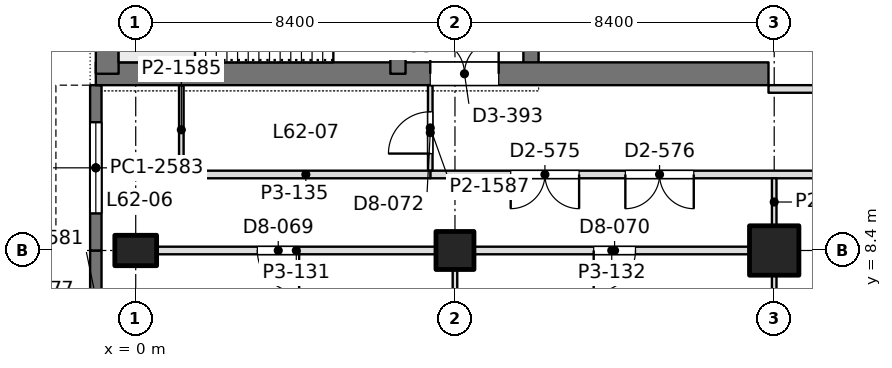
"""IFC4 building model, lengths in metres.
Left out: names, types, materials, properties, quantities, classifications, styles, units other than length and angle.
Written with IfcOpenShell. Run it as: python <this file> out.ifc"""

import sys

from ifc_helpers import new_model, si_unit, direction, frame, frame_2d, origin, origin_2d, place, context, subcontext, project, spatial, rectangle, extrude, element, fill, save


model = new_model("IFC4")
c1 = context("Model", 3, precision=1e-05, world=origin(), true_north=direction((0.0, 1.0)))
c2 = subcontext(c1, "Body", "Model", "MODEL_VIEW")
j1 = project(units=[si_unit("LENGTHUNIT", "METRE"), si_unit("PLANEANGLEUNIT", "RADIAN")], contexts=[c1])
p1 = place(None, origin())
s1 = spatial("IfcSite", under=j1, at=p1, CompositionType="ELEMENT")
p2 = place(p1, origin())
s2 = spatial("IfcBuilding", under=s1, at=p2, CompositionType="ELEMENT")
p3 = place(p2, frame((0.0, 0.0, 272.7)))
s3 = spatial("IfcBuildingStorey", under=s2, at=p3, CompositionType="ELEMENT", Elevation=272.7)
p4 = place(p3, frame((0.0, 8.4, 0.0), z_axis=(0.0, 0.0, 1.0), x_axis=(0.0, 1.0, 0.0)))
e1 = element("IfcColumn", 1, at=p4, inside=s3, PredefinedType="COLUMN", context=c2, shape_type="SweptSolid", body=[
    extrude(rectangle(XDim=0.8, YDim=1.1, at=origin_2d()), origin(), (0.0, 0.0, 1.0), 4.5),
])
p5 = place(p3, frame((8.4, 8.4, 0.0), z_axis=(0.0, 0.0, 1.0), x_axis=(1.0, 0.0, 0.0)))
e2 = element("IfcColumn", 2, at=p5, inside=s3, PredefinedType="COLUMN", context=c2, shape_type="SweptSolid", body=[
    extrude(rectangle(XDim=1.0, YDim=1.0, at=origin_2d()), origin(), (0.0, 0.0, 1.0), 4.5),
])
p6 = place(p3, frame((16.8, 8.4, 0.0), z_axis=(0.0, 0.0, 1.0), x_axis=(1.0, 0.0, 0.0)))
e3 = element("IfcColumn", 3, at=p6, inside=s3, PredefinedType="COLUMN", context=c2, shape_type="SweptSolid", body=[
    extrude(rectangle(XDim=1.3, YDim=1.3, at=origin_2d()), origin(), (0.0, 0.0, 1.0), 4.5),
])
p7 = place(p3, frame((-1.05, 13.05, 0.0), z_axis=(0.0, 0.0, 1.0), x_axis=(1.0, 0.0, 0.0)))
e4 = element("IfcWall", 4, at=p7, inside=s3, PredefinedType="SHEAR", context=c2, shape_type="SweptSolid", body=[
    extrude(rectangle(XDim=17.7, YDim=0.6, at=frame_2d((8.85, 0.0))), origin(), (0.0, 0.0, 1.0), 4.5),
])
p8 = place(p7, frame((8.8, 0.0, 0.0)))
e5 = element("IfcOpeningElement", 5, at=p8, cuts=e4, PredefinedType="OPENING", context=c2, shape_type="SweptSolid", body=[
    extrude(rectangle(XDim=1.8, YDim=2.4, at=frame_2d((0.9, 1.2))), frame((0.0, 0.31, 0.0), z_axis=(0.0, -1.0, 0.0), x_axis=(1.0, 0.0, 0.0)), (0.0, 0.0, 1.0), 0.62),
])
p9 = place(p3, frame((-0.75, 13.05, 0.0), z_axis=(0.0, 0.0, 1.0), x_axis=(0.0, 1.0, 0.0)))
e6 = element("IfcWall", 6, at=p9, inside=s3, PredefinedType="SHEAR", context=c2, shape_type="SweptSolid", body=[
    extrude(rectangle(XDim=24.3, YDim=0.6, at=frame_2d((12.15, 0.0))), origin(), (0.0, 0.0, 1.0), 4.5),
])
p10 = place(p3, frame((6.9, 13.05, 0.0), z_axis=(0.0, 0.0, 1.0), x_axis=(0.0, 1.0, 0.0)))
e7 = element("IfcWall", 7, at=p10, inside=s3, PredefinedType="SHEAR", context=c2, shape_type="SweptSolid", body=[
    extrude(rectangle(XDim=24.3, YDim=0.4, at=frame_2d((12.15, 0.0))), origin(), (0.0, 0.0, 1.0), 4.5),
])
p11 = place(p10, frame((1.3, 0.0, 0.0)))
e8 = element("IfcOpeningElement", 8, at=p11, cuts=e7, PredefinedType="OPENING", context=c2, shape_type="SweptSolid", body=[
    extrude(rectangle(XDim=1.0, YDim=2.2, at=frame_2d((0.5, 1.1))), frame((0.0, 0.21, 0.0), z_axis=(0.0, -1.0, 0.0), x_axis=(1.0, 0.0, 0.0)), (0.0, 0.0, 1.0), 0.42),
])
p12 = place(p10, frame((22.0, 0.0, 0.0)))
e9 = element("IfcOpeningElement", 9, at=p12, cuts=e7, PredefinedType="OPENING", context=c2, shape_type="SweptSolid", body=[
    extrude(rectangle(XDim=1.0, YDim=2.2, at=frame_2d((0.5, 1.1))), frame((0.0, 0.21, 0.0), z_axis=(0.0, -1.0, 0.0), x_axis=(1.0, 0.0, 0.0)), (0.0, 0.0, 1.0), 0.42),
])
p13 = place(p10, frame((5.55, 0.0, 0.0)))
e10 = element("IfcOpeningElement", 10, at=p13, cuts=e7, PredefinedType="OPENING", context=c2, shape_type="SweptSolid", body=[
    extrude(rectangle(XDim=1.0, YDim=2.2, at=frame_2d((0.5, 1.1))), frame((0.0, 0.21, 0.0), z_axis=(0.0, -1.0, 0.0), x_axis=(1.0, 0.0, 0.0)), (0.0, 0.0, 1.0), 0.42),
])
p14 = place(p10, frame((9.55, 0.0, 0.0)))
e11 = element("IfcOpeningElement", 11, at=p14, cuts=e7, PredefinedType="OPENING", context=c2, shape_type="SweptSolid", body=[
    extrude(rectangle(XDim=1.0, YDim=2.2, at=frame_2d((0.5, 1.1))), frame((0.0, 0.21, 0.0), z_axis=(0.0, -1.0, 0.0), x_axis=(1.0, 0.0, 0.0)), (0.0, 0.0, 1.0), 0.42),
])
p15 = place(p10, frame((12.8, 0.0, 0.0)))
e12 = element("IfcOpeningElement", 12, at=p15, cuts=e7, PredefinedType="OPENING", context=c2, shape_type="SweptSolid", body=[
    extrude(rectangle(XDim=1.1, YDim=2.2, at=frame_2d((0.55, 1.1))), frame((0.0, 0.21, 0.0), z_axis=(0.0, -1.0, 0.0), x_axis=(1.0, 0.0, 0.0)), (0.0, 0.0, 1.0), 0.42),
])
p16 = place(p10, frame((15.538, 0.0, 0.0)))
e13 = element("IfcOpeningElement", 13, at=p16, cuts=e7, PredefinedType="OPENING", context=c2, shape_type="SweptSolid", body=[
    extrude(rectangle(XDim=1.1, YDim=2.2, at=frame_2d((0.55, 1.1))), frame((0.0, 0.21, 0.0), z_axis=(0.0, -1.0, 0.0), x_axis=(1.0, 0.0, 0.0)), (0.0, 0.0, 1.0), 0.42),
])
p17 = place(p10, frame((18.262, 0.0, 0.0)))
e14 = element("IfcOpeningElement", 14, at=p17, cuts=e7, PredefinedType="OPENING", context=c2, shape_type="SweptSolid", body=[
    extrude(rectangle(XDim=1.1, YDim=2.2, at=frame_2d((0.55, 1.1))), frame((0.0, 0.21, 0.0), z_axis=(0.0, -1.0, 0.0), x_axis=(1.0, 0.0, 0.0)), (0.0, 0.0, 1.0), 0.42),
])
p18 = place(p3, frame((10.4, 13.05, 0.0), z_axis=(0.0, 0.0, 1.0), x_axis=(0.0, 1.0, 0.0)))
e15 = element("IfcWall", 15, at=p18, inside=s3, PredefinedType="SHEAR", context=c2, shape_type="SweptSolid", body=[
    extrude(rectangle(XDim=24.3, YDim=0.4, at=frame_2d((12.15, 0.0))), origin(), (0.0, 0.0, 1.0), 4.5),
])
p19 = place(p18, frame((15.75, 0.0, 0.0)))
e16 = element("IfcOpeningElement", 16, at=p19, cuts=e15, PredefinedType="OPENING", context=c2, shape_type="SweptSolid", body=[
    extrude(rectangle(XDim=1.1, YDim=2.2, at=frame_2d((0.55, 1.1))), frame((0.0, 0.21, 0.0), z_axis=(0.0, -1.0, 0.0), x_axis=(1.0, 0.0, 0.0)), (0.0, 0.0, 1.0), 0.42),
])
p20 = place(p18, frame((18.6, 0.0, 0.0)))
e17 = element("IfcOpeningElement", 17, at=p20, cuts=e15, PredefinedType="OPENING", context=c2, shape_type="SweptSolid", body=[
    extrude(rectangle(XDim=1.1, YDim=2.2, at=frame_2d((0.55, 1.1))), frame((0.0, 0.21, 0.0), z_axis=(0.0, -1.0, 0.0), x_axis=(1.0, 0.0, 0.0)), (0.0, 0.0, 1.0), 0.42),
])
p21 = place(p18, frame((21.45, 0.0, 0.0)))
e18 = element("IfcOpeningElement", 18, at=p21, cuts=e15, PredefinedType="OPENING", context=c2, shape_type="SweptSolid", body=[
    extrude(rectangle(XDim=1.1, YDim=2.2, at=frame_2d((0.55, 1.1))), frame((0.0, 0.21, 0.0), z_axis=(0.0, -1.0, 0.0), x_axis=(1.0, 0.0, 0.0)), (0.0, 0.0, 1.0), 0.42),
])
p22 = place(p18, frame((8.65, 0.0, 0.0)))
e19 = element("IfcOpeningElement", 19, at=p22, cuts=e15, PredefinedType="OPENING", context=c2, shape_type="SweptSolid", body=[
    extrude(rectangle(XDim=1.8, YDim=2.4, at=frame_2d((0.9, 1.2))), frame((0.0, 0.21, 0.0), z_axis=(0.0, -1.0, 0.0), x_axis=(1.0, 0.0, 0.0)), (0.0, 0.0, 1.0), 0.42),
])
p23 = place(p3, frame((-1.05, 5.915, 0.0), z_axis=(0.0, 0.0, 1.0), x_axis=(0.0, 1.0, 0.0)))
e20 = element("IfcWall", 20, at=p23, inside=s3, PredefinedType="SOLIDWALL", context=c2, shape_type="SweptSolid", body=[
    extrude(rectangle(XDim=2.485, YDim=0.3, at=frame_2d((1.243, 0.0))), origin(), (0.0, 0.0, 1.0), 4.35),
])
p24 = place(p3, frame((-1.05, 8.4, 0.0), z_axis=(0.0, 0.0, 1.0), x_axis=(0.0, 1.0, 0.0)))
e21 = element("IfcWall", 21, at=p24, inside=s3, PredefinedType="SOLIDWALL", context=c2, shape_type="SweptSolid", body=[
    extrude(rectangle(XDim=4.35, YDim=0.3, at=frame_2d((2.175, 0.0))), origin(), (0.0, 0.0, 1.0), 4.35),
])
p25 = place(p24, frame((0.975, 0.0, 0.9)))
e22 = element("IfcOpeningElement", 22, at=p25, cuts=e21, PredefinedType="OPENING", context=c2, shape_type="SweptSolid", body=[
    extrude(rectangle(XDim=2.4, YDim=1.9, at=frame_2d((1.2, 0.95))), frame((0.0, 0.16, 0.0), z_axis=(0.0, -1.0, 0.0), x_axis=(1.0, 0.0, 0.0)), (0.0, 0.0, 1.0), 0.32),
])
p26 = place(p3, frame((0.549, 8.4, 0.0), z_axis=(0.0, 0.0, 1.0), x_axis=(1.0, 0.0, 0.0)))
e23 = element("IfcWall", 23, at=p26, inside=s3, PredefinedType="PARTITIONING", context=c2, shape_type="SweptSolid", body=[
    extrude(rectangle(XDim=7.352, YDim=0.2, at=frame_2d((3.676, 0.0))), origin(), (0.0, 0.0, 1.0), 3.8),
])
p27 = place(p26, frame((2.651, 0.0, 0.0)))
e24 = element("IfcOpeningElement", 24, at=p27, cuts=e23, PredefinedType="OPENING", context=c2, shape_type="SweptSolid", body=[
    extrude(rectangle(XDim=1.1, YDim=2.4, at=frame_2d((0.55, 1.2))), frame((0.0, 0.11, 0.0), z_axis=(0.0, -1.0, 0.0), x_axis=(1.0, 0.0, 0.0)), (0.0, 0.0, 1.0), 0.22),
])
p28 = place(p3, frame((8.899, 8.4, 0.0), z_axis=(0.0, 0.0, 1.0), x_axis=(1.0, 0.0, 0.0)))
e25 = element("IfcWall", 25, at=p28, inside=s3, PredefinedType="PARTITIONING", context=c2, shape_type="SweptSolid", body=[
    extrude(rectangle(XDim=7.252, YDim=0.2, at=frame_2d((3.626, 0.0))), origin(), (0.0, 0.0, 1.0), 3.8),
])
p29 = place(p28, frame((3.151, 0.0, 0.0)))
e26 = element("IfcOpeningElement", 26, at=p29, cuts=e25, PredefinedType="OPENING", context=c2, shape_type="SweptSolid", body=[
    extrude(rectangle(XDim=1.1, YDim=2.4, at=frame_2d((0.55, 1.2))), frame((0.0, 0.11, 0.0), z_axis=(0.0, -1.0, 0.0), x_axis=(1.0, 0.0, 0.0)), (0.0, 0.0, 1.0), 0.22),
])
p30 = place(p3, frame((8.4, 6.149, 0.0), z_axis=(0.0, 0.0, 1.0), x_axis=(0.0, 1.0, 0.0)))
e27 = element("IfcWall", 27, at=p30, inside=s3, PredefinedType="PARTITIONING", context=c2, shape_type="SweptSolid", body=[
    extrude(rectangle(XDim=1.752, YDim=0.12, at=frame_2d((0.876, 0.0))), origin(), (0.0, 0.0, 1.0), 3.99),
])
p31 = place(p3, frame((16.8, 6.149, 0.0), z_axis=(0.0, 0.0, 1.0), x_axis=(0.0, 1.0, 0.0)))
e28 = element("IfcWall", 28, at=p31, inside=s3, PredefinedType="PARTITIONING", context=c2, shape_type="SweptSolid", body=[
    extrude(rectangle(XDim=1.602, YDim=0.12, at=frame_2d((0.801, 0.0))), origin(), (0.0, 0.0, 1.0), 3.99),
])
p32 = place(p3, frame((16.8, 9.049, 0.0), z_axis=(0.0, 0.0, 1.0), x_axis=(0.0, 1.0, 0.0)))
e29 = element("IfcWall", 29, at=p32, inside=s3, PredefinedType="PARTITIONING", context=c2, shape_type="SweptSolid", body=[
    extrude(rectangle(XDim=1.253, YDim=0.12, at=frame_2d((0.626, 0.0))), origin(), (0.0, 0.0, 1.0), 3.99),
])
p33 = place(p3, frame((7.748, 10.4, 0.0), z_axis=(0.0, 0.0, 1.0), x_axis=(1.0, 0.0, 0.0)))
e30 = element("IfcWall", 30, at=p33, inside=s3, PredefinedType="PARTITIONING", context=c2, shape_type="SweptSolid", body=[
    extrude(rectangle(XDim=41.452, YDim=0.2, at=frame_2d((20.726, 0.0))), origin(), (0.0, 0.0, 1.0), 3.8),
])
p34 = place(p33, frame((2.119, 0.0, 0.0)))
e31 = element("IfcOpeningElement", 31, at=p34, cuts=e30, PredefinedType="OPENING", context=c2, shape_type="SweptSolid", body=[
    extrude(rectangle(XDim=1.8, YDim=2.2, at=frame_2d((0.9, 1.1))), frame((0.0, 0.11, 0.0), z_axis=(0.0, -1.0, 0.0), x_axis=(1.0, 0.0, 0.0)), (0.0, 0.0, 1.0), 0.22),
])
p35 = place(p33, frame((5.135, 0.0, 0.0)))
e32 = element("IfcOpeningElement", 32, at=p35, cuts=e30, PredefinedType="OPENING", context=c2, shape_type="SweptSolid", body=[
    extrude(rectangle(XDim=1.8, YDim=2.2, at=frame_2d((0.9, 1.1))), frame((0.0, 0.11, 0.0), z_axis=(0.0, -1.0, 0.0), x_axis=(1.0, 0.0, 0.0)), (0.0, 0.0, 1.0), 0.22),
])
p36 = place(p33, frame((18.952, 0.0, 0.0)))
e33 = element("IfcOpeningElement", 33, at=p36, cuts=e30, PredefinedType="OPENING", context=c2, shape_type="SweptSolid", body=[
    extrude(rectangle(XDim=1.8, YDim=2.2, at=frame_2d((0.9, 1.1))), frame((0.0, 0.11, 0.0), z_axis=(0.0, -1.0, 0.0), x_axis=(1.0, 0.0, 0.0)), (0.0, 0.0, 1.0), 0.22),
])
p37 = place(p33, frame((29.752, 0.0, 0.0)))
e34 = element("IfcOpeningElement", 34, at=p37, cuts=e30, PredefinedType="OPENING", context=c2, shape_type="SweptSolid", body=[
    extrude(rectangle(XDim=1.8, YDim=2.2, at=frame_2d((0.9, 1.1))), frame((0.0, 0.11, 0.0), z_axis=(0.0, -1.0, 0.0), x_axis=(1.0, 0.0, 0.0)), (0.0, 0.0, 1.0), 0.22),
])
p38 = place(p3, frame((7.75, 10.498, 0.0), z_axis=(0.0, 0.0, 1.0), x_axis=(0.0, 1.0, 0.0)))
e35 = element("IfcWall", 35, at=p38, inside=s3, PredefinedType="PARTITIONING", context=c2, shape_type="SweptSolid", body=[
    extrude(rectangle(XDim=2.254, YDim=0.12, at=frame_2d((1.127, 0.0))), origin(), (0.0, 0.0, 1.0), 4.35),
])
p39 = place(p38, frame((0.452, 0.0, 0.0)))
e36 = element("IfcOpeningElement", 36, at=p39, cuts=e35, PredefinedType="OPENING", context=c2, shape_type="SweptSolid", body=[
    extrude(rectangle(XDim=1.1, YDim=2.4, at=frame_2d((0.55, 1.2))), frame((0.0, 0.07, 0.0), z_axis=(0.0, -1.0, 0.0), x_axis=(1.0, 0.0, 0.0)), (0.0, 0.0, 1.0), 0.14),
])
p40 = place(p3, frame((1.2, 10.4, 0.0), z_axis=(0.0, 0.0, 1.0), x_axis=(1.0, 0.0, 0.0)))
e37 = element("IfcWall", 37, at=p40, inside=s3, PredefinedType="PARTITIONING", context=c2, shape_type="SweptSolid", body=[
    extrude(rectangle(XDim=6.552, YDim=0.2, at=frame_2d((3.276, 0.0))), origin(), (0.0, 0.0, 1.0), 4.35),
])
p41 = place(p3, frame((1.2, 10.4, 0.0), z_axis=(0.0, 0.0, 1.0), x_axis=(0.0, 1.0, 0.0)))
e38 = element("IfcWall", 38, at=p41, inside=s3, PredefinedType="PARTITIONING", context=c2, shape_type="SweptSolid", body=[
    extrude(rectangle(XDim=2.352, YDim=0.12, at=frame_2d((1.176, 0.0))), origin(), (0.0, 0.0, 1.0), 4.35),
])
p42 = place(p3, frame((16.65, 12.65, 0.0), z_axis=(0.0, 0.0, 1.0), x_axis=(1.0, 0.0, 0.0)))
e39 = element("IfcWall", 39, at=p42, inside=s3, PredefinedType="PARTITIONING", context=c2, shape_type="SweptSolid", body=[
    extrude(rectangle(XDim=17.1, YDim=0.2, at=frame_2d((8.55, 0.0))), origin(), (0.0, 0.0, 1.0), 3.8),
])
p43 = place(p42, frame((7.65, 0.0, 0.0)))
e40 = element("IfcOpeningElement", 40, at=p43, cuts=e39, PredefinedType="OPENING", context=c2, shape_type="SweptSolid", body=[
    extrude(rectangle(XDim=1.8, YDim=2.2, at=frame_2d((0.9, 1.1))), frame((0.0, 0.11, 0.0), z_axis=(0.0, -1.0, 0.0), x_axis=(1.0, 0.0, 0.0)), (0.0, 0.0, 1.0), 0.22),
])
p44 = place(p25, origin())
e41 = element("IfcWindow", 41, at=p44, inside=s3, PartitioningType="SINGLE_PANEL", PredefinedType="WINDOW", context=c2, shape_type="SweptSolid", body=[
    extrude(rectangle(XDim=2.4, YDim=1.9, at=frame_2d((1.2, 0.95))), frame((0.0, 0.03, 0.0), z_axis=(0.0, -1.0, 0.0), x_axis=(1.0, 0.0, 0.0)), (0.0, 0.0, 1.0), 0.06),
])
fill(e22, e41)
p45 = place(p8, origin())
e42 = element("IfcDoor", 42, at=p45, inside=s3, OperationType="DOUBLE_DOOR_SINGLE_SWING", PredefinedType="DOOR", context=c2, shape_type="SweptSolid", body=[
    extrude(rectangle(XDim=1.8, YDim=2.4, at=frame_2d((0.9, 1.2))), frame((0.0, 0.025, 0.0), z_axis=(0.0, -1.0, 0.0), x_axis=(1.0, 0.0, 0.0)), (0.0, 0.0, 1.0), 0.05),
])
fill(e5, e42)
p46 = place(p27, frame((1.1, 0.0, 0.0), z_axis=(0.0, 0.0, 1.0), x_axis=(-1.0, 0.0, 0.0)))
e43 = element("IfcDoor", 43, at=p46, inside=s3, OperationType="SINGLE_SWING_LEFT", PredefinedType="DOOR", context=c2, shape_type="SweptSolid", body=[
    extrude(rectangle(XDim=1.1, YDim=2.4, at=frame_2d((0.55, 1.2))), frame((0.0, 0.025, 0.0), z_axis=(0.0, -1.0, 0.0), x_axis=(1.0, 0.0, 0.0)), (0.0, 0.0, 1.0), 0.05),
])
fill(e24, e43)
p47 = place(p29, frame((1.1, 0.0, 0.0), z_axis=(0.0, 0.0, 1.0), x_axis=(-1.0, 0.0, 0.0)))
e44 = element("IfcDoor", 44, at=p47, inside=s3, OperationType="SINGLE_SWING_RIGHT", PredefinedType="DOOR", context=c2, shape_type="SweptSolid", body=[
    extrude(rectangle(XDim=1.1, YDim=2.4, at=frame_2d((0.55, 1.2))), frame((0.0, 0.025, 0.0), z_axis=(0.0, -1.0, 0.0), x_axis=(1.0, 0.0, 0.0)), (0.0, 0.0, 1.0), 0.05),
])
fill(e26, e44)
p48 = place(p34, frame((1.8, 0.0, 0.0), z_axis=(0.0, 0.0, 1.0), x_axis=(-1.0, 0.0, 0.0)))
e45 = element("IfcDoor", 45, at=p48, inside=s3, OperationType="DOUBLE_DOOR_SINGLE_SWING", PredefinedType="DOOR", context=c2, shape_type="SweptSolid", body=[
    extrude(rectangle(XDim=1.8, YDim=2.2, at=frame_2d((0.9, 1.1))), frame((0.0, 0.025, 0.0), z_axis=(0.0, -1.0, 0.0), x_axis=(1.0, 0.0, 0.0)), (0.0, 0.0, 1.0), 0.05),
])
fill(e31, e45)
p49 = place(p35, frame((1.8, 0.0, 0.0), z_axis=(0.0, 0.0, 1.0), x_axis=(-1.0, 0.0, 0.0)))
e46 = element("IfcDoor", 46, at=p49, inside=s3, OperationType="DOUBLE_DOOR_SINGLE_SWING", PredefinedType="DOOR", context=c2, shape_type="SweptSolid", body=[
    extrude(rectangle(XDim=1.8, YDim=2.2, at=frame_2d((0.9, 1.1))), frame((0.0, 0.025, 0.0), z_axis=(0.0, -1.0, 0.0), x_axis=(1.0, 0.0, 0.0)), (0.0, 0.0, 1.0), 0.05),
])
fill(e32, e46)
p50 = place(p39, origin())
e47 = element("IfcDoor", 47, at=p50, inside=s3, OperationType="SINGLE_SWING_LEFT", PredefinedType="DOOR", context=c2, shape_type="SweptSolid", body=[
    extrude(rectangle(XDim=1.1, YDim=2.4, at=frame_2d((0.55, 1.2))), frame((0.0, 0.025, 0.0), z_axis=(0.0, -1.0, 0.0), x_axis=(1.0, 0.0, 0.0)), (0.0, 0.0, 1.0), 0.05),
])
fill(e36, e47)
save(model, sys.argv[1])
